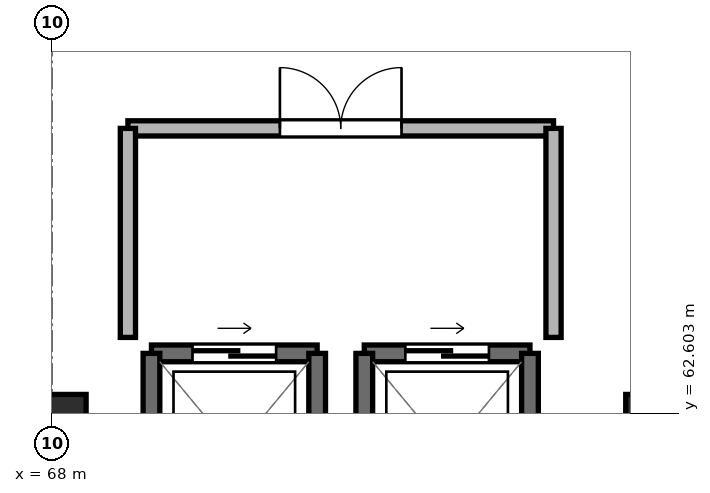
"""IFC4 building model, lengths in metres.
Left out: names, types, materials, properties, quantities, classifications, styles, units other than length and angle.
Written with IfcOpenShell. Run it as: python <this file> out.ifc"""

import sys

from ifc_helpers import new_model, si_unit, direction, frame, frame_2d, origin, origin_2d, place, context, subcontext, project, spatial, rectangle, extrude, element, fill, save


model = new_model("IFC4")
c1 = context("Model", 3, precision=1e-05, world=origin(), true_north=direction((0.0, 1.0)))
c2 = subcontext(c1, "Body", "Model", "MODEL_VIEW")
j1 = project(units=[si_unit("LENGTHUNIT", "METRE"), si_unit("PLANEANGLEUNIT", "RADIAN")], contexts=[c1])
p1 = place(None, origin())
s1 = spatial("IfcSite", under=j1, at=p1, CompositionType="ELEMENT")
p2 = place(p1, origin())
s2 = spatial("IfcBuilding", under=s1, at=p2, CompositionType="ELEMENT")
p3 = place(p2, frame((0.0, 0.0, 24.15)))
s3 = spatial("IfcBuildingStorey", under=s2, at=p3, CompositionType="ELEMENT", Elevation=24.15)
for number, where, z_axis, x_axis in (
    (1, (68.0, 62.4, -0.5), (0.0, 0.0, 1.0), (1.0, 0.0, 0.0)),
    (2, (76.0, 62.4, -0.5), (0.0, 0.0, 1.0), (1.0, 0.0, 0.0)),
):
    element("IfcColumn", number, at=place(p3, frame(where, z_axis=z_axis, x_axis=x_axis)), inside=s3, PredefinedType="COLUMN", context=c2, shape_type="SweptSolid", body=[
        extrude(rectangle(XDim=0.9, YDim=0.9, at=origin_2d()), origin(), (0.0, 0.0, 1.0), 3.64),
    ])
p4 = place(p3, frame((71.49, 63.39, 0.0), z_axis=(0.0, 0.0, 1.0), x_axis=(-1.0, 0.0, 0.0)))
e3 = element("IfcWall", 3, at=p4, inside=s3, PredefinedType="SHEAR", context=c2, shape_type="SweptSolid", body=[
    extrude(rectangle(XDim=2.18, YDim=0.22, at=frame_2d((1.09, 0.0))), origin(), (0.0, 0.0, 1.0), 3.14),
])
p5 = place(p4, frame((0.54, 0.0, 0.0)))
e4 = element("IfcOpeningElement", 4, at=p5, cuts=e3, PredefinedType="OPENING", context=c2, shape_type="SweptSolid", body=[
    extrude(rectangle(XDim=1.1, YDim=2.2, at=frame_2d((0.55, 1.1))), frame((0.0, 0.122, 0.0), z_axis=(0.0, -1.0, 0.0), x_axis=(1.0, 0.0, 0.0)), (0.0, 0.0, 1.0), 0.244),
])
for number, where, z_axis, x_axis in (
    (5, (69.31, 63.39, 0.0), (0.0, 0.0, 1.0), (0.0, -1.0, 0.0)),
    (6, (71.49, 60.81, 0.0), (0.0, 0.0, 1.0), (0.0, 1.0, 0.0)),
):
    element("IfcWall", number, at=place(p3, frame(where, z_axis=z_axis, x_axis=x_axis)), inside=s3, PredefinedType="SHEAR", context=c2, shape_type="SweptSolid", body=[
        extrude(rectangle(XDim=2.58, YDim=0.22, at=frame_2d((1.29, 0.0))), origin(), (0.0, 0.0, 1.0), 3.14),
    ])
p6 = place(p3, frame((74.29, 63.39, 0.0), z_axis=(0.0, 0.0, 1.0), x_axis=(-1.0, 0.0, 0.0)))
e7 = element("IfcWall", 7, at=p6, inside=s3, PredefinedType="SHEAR", context=c2, shape_type="SweptSolid", body=[
    extrude(rectangle(XDim=2.18, YDim=0.22, at=frame_2d((1.09, 0.0))), origin(), (0.0, 0.0, 1.0), 3.14),
])
p7 = place(p6, frame((0.54, 0.0, 0.0)))
e8 = element("IfcOpeningElement", 8, at=p7, cuts=e7, PredefinedType="OPENING", context=c2, shape_type="SweptSolid", body=[
    extrude(rectangle(XDim=1.1, YDim=2.2, at=frame_2d((0.55, 1.1))), frame((0.0, 0.122, 0.0), z_axis=(0.0, -1.0, 0.0), x_axis=(1.0, 0.0, 0.0)), (0.0, 0.0, 1.0), 0.244),
])
for number, where, z_axis, x_axis in (
    (9, (72.11, 63.39, 0.0), (0.0, 0.0, 1.0), (0.0, -1.0, 0.0)),
    (10, (74.29, 60.81, 0.0), (0.0, 0.0, 1.0), (0.0, 1.0, 0.0)),
):
    element("IfcWall", number, at=place(p3, frame(where, z_axis=z_axis, x_axis=x_axis)), inside=s3, PredefinedType="SHEAR", context=c2, shape_type="SweptSolid", body=[
        extrude(rectangle(XDim=2.58, YDim=0.22, at=frame_2d((1.29, 0.0))), origin(), (0.0, 0.0, 1.0), 3.14),
    ])
p8 = place(p3, frame((69.0, 66.35, 0.0), z_axis=(0.0, 0.0, 1.0), x_axis=(1.0, 0.0, 0.0)))
e11 = element("IfcWall", 11, at=p8, inside=s3, PredefinedType="PARTITIONING", context=c2, shape_type="SweptSolid", body=[
    extrude(rectangle(XDim=5.6, YDim=0.2, at=frame_2d((2.8, 0.0))), origin(), (0.0, 0.0, 1.0), 2.68),
])
p9 = place(p8, frame((2.0, 0.0, 0.0)))
e12 = element("IfcOpeningElement", 12, at=p9, cuts=e11, PredefinedType="OPENING", context=c2, shape_type="SweptSolid", body=[
    extrude(rectangle(XDim=1.6, YDim=2.2, at=frame_2d((0.8, 1.1))), frame((0.0, 0.112, 0.0), z_axis=(0.0, -1.0, 0.0), x_axis=(1.0, 0.0, 0.0)), (0.0, 0.0, 1.0), 0.224),
])
for number, where, z_axis, x_axis in (
    (13, (69.0, 63.6, 0.0), (0.0, 0.0, 1.0), (0.0, 1.0, 0.0)),
    (14, (74.6, 63.6, 0.0), (0.0, 0.0, 1.0), (0.0, 1.0, 0.0)),
):
    element("IfcWall", number, at=place(p3, frame(where, z_axis=z_axis, x_axis=x_axis)), inside=s3, PredefinedType="PARTITIONING", context=c2, shape_type="SweptSolid", body=[
        extrude(rectangle(XDim=2.75, YDim=0.2, at=frame_2d((1.375, 0.0))), origin(), (0.0, 0.0, 1.0), 2.68),
    ])
p10 = place(p5, origin())
e15 = element("IfcDoor", 15, at=p10, inside=s3, OperationType="SLIDING_TO_LEFT", PredefinedType="DOOR", context=c2, shape_type="SweptSolid", body=[
    extrude(rectangle(XDim=1.1, YDim=2.2, at=frame_2d((0.55, 1.1))), frame((0.0, 0.025, 0.0), z_axis=(0.0, -1.0, 0.0), x_axis=(1.0, 0.0, 0.0)), (0.0, 0.0, 1.0), 0.05),
])
fill(e4, e15)
p11 = place(p7, origin())
e16 = element("IfcDoor", 16, at=p11, inside=s3, OperationType="SLIDING_TO_LEFT", PredefinedType="DOOR", context=c2, shape_type="SweptSolid", body=[
    extrude(rectangle(XDim=1.1, YDim=2.2, at=frame_2d((0.55, 1.1))), frame((0.0, 0.025, 0.0), z_axis=(0.0, -1.0, 0.0), x_axis=(1.0, 0.0, 0.0)), (0.0, 0.0, 1.0), 0.05),
])
fill(e8, e16)
p12 = place(p9, origin())
e17 = element("IfcDoor", 17, at=p12, inside=s3, OperationType="DOUBLE_DOOR_SINGLE_SWING", PredefinedType="DOOR", context=c2, shape_type="SweptSolid", body=[
    extrude(rectangle(XDim=1.6, YDim=2.2, at=frame_2d((0.8, 1.1))), frame((0.0, 0.025, 0.0), z_axis=(0.0, -1.0, 0.0), x_axis=(1.0, 0.0, 0.0)), (0.0, 0.0, 1.0), 0.05),
])
fill(e12, e17)
save(model, sys.argv[1])
